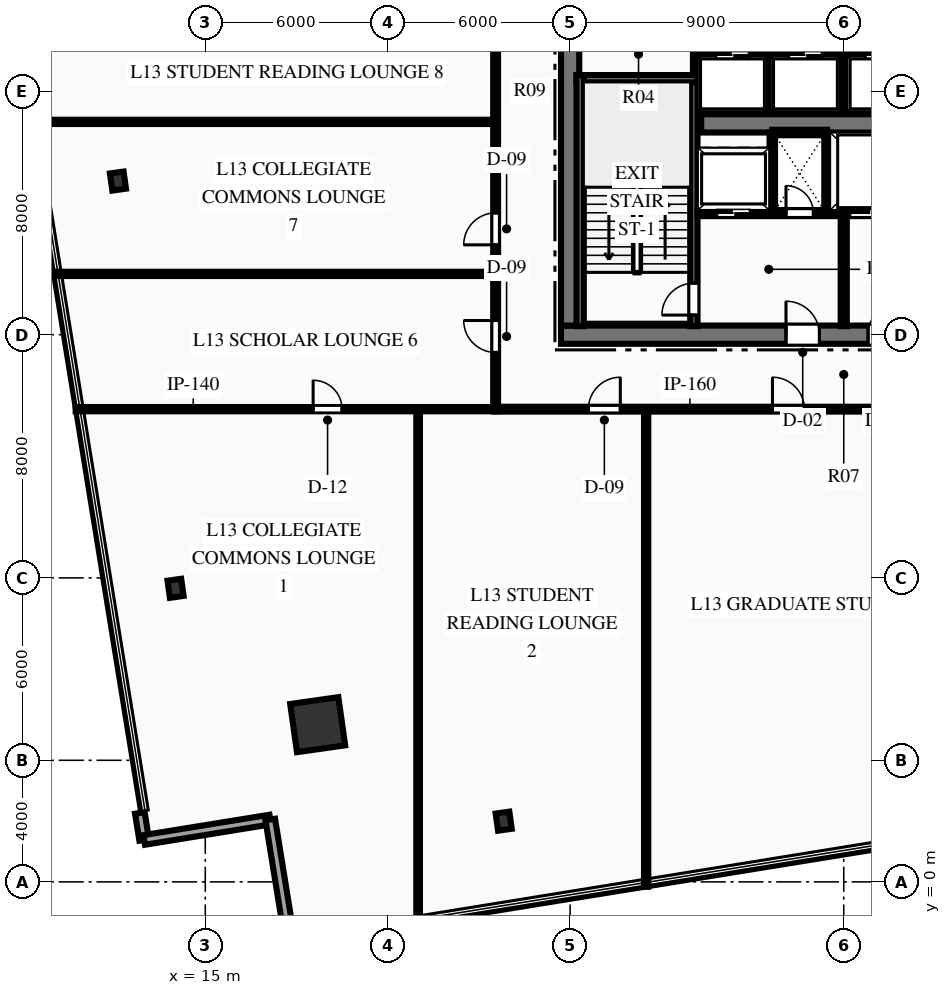
"""IFC4 building model, lengths in metres.
Left out: names, types, materials, properties, quantities, classifications, styles, units other than length and angle.
Written with IfcOpenShell. Run it as: python <this file> out.ifc"""

import sys

from ifc_helpers import new_model, si_unit, direction, frame, frame_2d, origin, origin_2d, place, context, subcontext, project, spatial, rectangle, hollow_rectangle, i_section, extrude, element, fill, save


model = new_model("IFC4")
c1 = context("Model", 3, precision=1e-05, world=origin(), true_north=direction((0.0, 1.0)))
c2 = subcontext(c1, "Body", "Model", "MODEL_VIEW")
j1 = project(units=[si_unit("LENGTHUNIT", "METRE"), si_unit("PLANEANGLEUNIT", "RADIAN")], contexts=[c1])
p1 = place(None, origin())
s1 = spatial("IfcSite", under=j1, at=p1, CompositionType="ELEMENT")
p2 = place(p1, origin())
s2 = spatial("IfcBuilding", under=s1, at=p2, CompositionType="ELEMENT")
p3 = place(p2, frame((0.0, 0.0, 58.95)))
s3 = spatial("IfcBuildingStorey", under=s2, at=p3, CompositionType="ELEMENT", Elevation=58.95)
p4 = place(p3, frame((26.7, 18.0, 0.0), z_axis=(0.0, 0.0, 1.0), x_axis=(1.0, 0.0, 0.0)))
e1 = element("IfcWall", 1, at=p4, inside=s3, PredefinedType="SHEAR", context=c2, shape_type="SweptSolid", body=[
    extrude(rectangle(XDim=18.6, YDim=0.6, at=frame_2d((9.3, 0.0))), origin(), (0.0, 0.0, 1.0), 3.75),
])
p5 = place(p4, frame((7.4, 0.0, 0.0)))
e2 = element("IfcOpeningElement", 2, at=p5, cuts=e1, PredefinedType="OPENING", context=c2, shape_type="SweptSolid", body=[
    extrude(rectangle(XDim=1.1, YDim=2.15, at=frame_2d((0.55, 1.075))), frame((0.0, 0.31, 0.0), z_axis=(0.0, -1.0, 0.0), x_axis=(1.0, 0.0, 0.0)), (0.0, 0.0, 1.0), 0.62),
])
p6 = place(p4, frame((10.1, 0.0, 0.0)))
e3 = element("IfcOpeningElement", 3, at=p6, cuts=e1, PredefinedType="OPENING", context=c2, shape_type="SweptSolid", body=[
    extrude(rectangle(XDim=1.1, YDim=2.15, at=frame_2d((0.55, 1.075))), frame((0.0, 0.31, 0.0), z_axis=(0.0, -1.0, 0.0), x_axis=(1.0, 0.0, 0.0)), (0.0, 0.0, 1.0), 0.62),
])
p7 = place(p3, frame((27.0, 18.3, 0.0), z_axis=(0.0, 0.0, 1.0), x_axis=(0.0, 1.0, 0.0)))
e4 = element("IfcWall", 4, at=p7, inside=s3, PredefinedType="SHEAR", context=c2, shape_type="SweptSolid", body=[
    extrude(rectangle(XDim=15.4, YDim=0.6, at=frame_2d((7.7, 0.0))), origin(), (0.0, 0.0, 1.0), 3.75),
])
p8 = place(p7, frame((9.94, 0.0, 0.0)))
e5 = element("IfcOpeningElement", 5, at=p8, cuts=e4, PredefinedType="OPENING", context=c2, shape_type="SweptSolid", body=[
    extrude(rectangle(XDim=1.4, YDim=2.2, at=frame_2d((0.7, 1.1))), frame((0.0, 0.31, 0.0), z_axis=(0.0, -1.0, 0.0), x_axis=(1.0, 0.0, 0.0)), (0.0, 0.0, 1.0), 0.62),
])
p9 = place(p3, frame((31.31, 24.95, 0.0), z_axis=(0.0, 0.0, 1.0), x_axis=(1.0, 0.0, 0.0)))
e6 = element("IfcWall", 6, at=p9, inside=s3, PredefinedType="SHEAR", context=c2, shape_type="SweptSolid", body=[
    extrude(rectangle(XDim=9.38, YDim=0.6, at=frame_2d((4.69, 0.0))), origin(), (0.0, 0.0, 1.0), 3.75),
])
p10 = place(p3, frame((31.07, 18.28, 0.0), z_axis=(0.0, 0.0, 1.0), x_axis=(0.0, 1.0, 0.0)))
e7 = element("IfcWall", 7, at=p10, inside=s3, PredefinedType="SHEAR", context=c2, shape_type="SweptSolid", body=[
    extrude(rectangle(XDim=8.26, YDim=0.24, at=frame_2d((4.13, 0.0))), origin(), (0.0, 0.0, 1.0), 3.75),
])
p11 = place(p10, frame((0.365, 0.0, 0.0)))
e8 = element("IfcOpeningElement", 8, at=p11, cuts=e7, PredefinedType="OPENING", context=c2, shape_type="SweptSolid", body=[
    extrude(rectangle(XDim=1.05, YDim=2.15, at=frame_2d((0.525, 1.075))), frame((0.0, 0.13, 0.0), z_axis=(0.0, -1.0, 0.0), x_axis=(1.0, 0.0, 0.0)), (0.0, 0.0, 1.0), 0.26),
])
p12 = place(p3, frame((27.21, 26.42, 0.0), z_axis=(0.0, 0.0, 1.0), x_axis=(1.0, 0.0, 0.0)))
e9 = element("IfcWall", 9, at=p12, inside=s3, PredefinedType="SHEAR", context=c2, shape_type="SweptSolid", body=[
    extrude(rectangle(XDim=3.98, YDim=0.24, at=frame_2d((1.99, 0.0))), origin(), (0.0, 0.0, 1.0), 3.75),
])
p13 = place(p3, frame((27.33, 18.28, 0.0), z_axis=(0.0, 0.0, 1.0), x_axis=(0.0, 1.0, 0.0)))
e10 = element("IfcWall", 10, at=p13, inside=s3, PredefinedType="SHEAR", context=c2, shape_type="SweptSolid", body=[
    extrude(rectangle(XDim=8.26, YDim=0.24, at=frame_2d((4.13, 0.0))), origin(), (0.0, 0.0, 1.0), 3.75),
])
p14 = place(p3, frame((18.696, 5.172, 0.0), z_axis=(0.0, 0.0, 1.0), x_axis=(0.990146240249, 0.140037219771, 0.0)))
e11 = element("IfcColumn", 11, at=p14, inside=s3, PredefinedType="COLUMN", context=c2, shape_type="SweptSolid", body=[
    extrude(hollow_rectangle(XDim=1.6, YDim=1.6, WallThickness=0.08, at=origin_2d()), origin(), (0.0, 0.0, 1.0), 3.75),
])
for number, where, z_axis, x_axis in (
    (12, (24.815, 1.997, 0.0), (0.0, 0.0, 1.0), (0.99, 0.14, 0.0)),
    (13, (12.127, 23.053, 0.0), (0.0, 0.0, 1.0), (0.99, 0.14, 0.0)),
    (14, (14.022, 9.657, 0.0), (0.0, 0.0, 1.0), (0.99, 0.14, 0.0)),
):
    element("IfcColumn", number, at=place(p3, frame(where, z_axis=z_axis, x_axis=x_axis)), inside=s3, PredefinedType="COLUMN", context=c2, shape_type="SweptSolid", body=[
        extrude(i_section(OverallWidth=0.454, OverallDepth=0.569, WebThickness=0.078, FlangeThickness=0.125, at=origin_2d()), origin(), (0.0, 0.0, 1.0), 3.75),
    ])
p15 = place(p3, frame((12.99, 1.379, 0.0), z_axis=(0.0, 0.0, 1.0), x_axis=(-0.160042584625, 0.987110110933, 0.0)))
e15 = element("IfcWall", 15, at=p15, inside=s3, PredefinedType="STANDARD", context=c2, shape_type="SweptSolid", body=[
    extrude(rectangle(XDim=0.9, YDim=0.32, at=frame_2d((0.45, 0.0))), origin(), (0.0, 0.0, 1.0), 3.44),
])
p16 = place(p3, frame((17.136, 2.051, 0.0), z_axis=(0.0, 0.0, 1.0), x_axis=(-0.987130042681, -0.159919601167, 0.0)))
e16 = element("IfcWall", 16, at=p16, inside=s3, PredefinedType="STANDARD", context=c2, shape_type="SweptSolid", body=[
    extrude(rectangle(XDim=4.2, YDim=0.32, at=frame_2d((2.1, 0.0))), origin(), (0.0, 0.0, 1.0), 3.44),
])
p17 = place(p3, frame((17.808, -2.095, 0.0), z_axis=(0.0, 0.0, 1.0), x_axis=(-0.159910424973, 0.987131529222, 0.0)))
e17 = element("IfcWall", 17, at=p17, inside=s3, PredefinedType="STANDARD", context=c2, shape_type="SweptSolid", body=[
    extrude(rectangle(XDim=4.2, YDim=0.32, at=frame_2d((2.1, 0.0))), origin(), (0.0, 0.0, 1.0), 3.44),
])
p18 = place(p3, frame((36.0, 18.28, 0.0), z_axis=(0.0, 0.0, 1.0), x_axis=(0.0, 1.0, 0.0)))
e18 = element("IfcWall", 18, at=p18, inside=s3, PredefinedType="PARTITIONING", context=c2, shape_type="SweptSolid", body=[
    extrude(rectangle(XDim=3.77, YDim=0.2, at=frame_2d((1.885, 0.0))), origin(), (0.0, 0.0, 1.0), 3.44),
])
p19 = place(p3, frame((31.19, 22.0, 0.0), z_axis=(0.0, 0.0, 1.0), x_axis=(1.0, 0.0, 0.0)))
e19 = element("IfcWall", 19, at=p19, inside=s3, PredefinedType="PARTITIONING", context=c2, shape_type="SweptSolid", body=[
    extrude(rectangle(XDim=4.69, YDim=0.2, at=frame_2d((2.345, 0.0))), origin(), (0.0, 0.0, 1.0), 3.44),
])
p20 = place(p19, frame((2.91, 0.0, 0.0)))
e20 = element("IfcOpeningElement", 20, at=p20, cuts=e19, PredefinedType="OPENING", context=c2, shape_type="SweptSolid", body=[
    extrude(rectangle(XDim=0.9, YDim=2.15, at=frame_2d((0.45, 1.075))), frame((0.0, 0.11, 0.0), z_axis=(0.0, -1.0, 0.0), x_axis=(1.0, 0.0, 0.0)), (0.0, 0.0, 1.0), 0.22),
])
p21 = place(p19, frame((0.635, 0.0, 0.0)))
e21 = element("IfcOpeningElement", 21, at=p21, cuts=e19, PredefinedType="OPENING", context=c2, shape_type="SweptSolid", body=[
    extrude(rectangle(XDim=1.1, YDim=2.15, at=frame_2d((0.55, 1.075))), frame((0.0, 0.11, 0.0), z_axis=(0.0, -1.0, 0.0), x_axis=(1.0, 0.0, 0.0)), (0.0, 0.0, 1.0), 0.22),
])
p22 = place(p3, frame((36.12, 22.0, 0.0), z_axis=(0.0, 0.0, 1.0), x_axis=(1.0, 0.0, 0.0)))
e22 = element("IfcWall", 22, at=p22, inside=s3, PredefinedType="PARTITIONING", context=c2, shape_type="SweptSolid", body=[
    extrude(rectangle(XDim=4.69, YDim=0.2, at=frame_2d((2.345, 0.0))), origin(), (0.0, 0.0, 1.0), 3.44),
])
p23 = place(p22, frame((2.955, 0.0, 0.0)))
e23 = element("IfcOpeningElement", 23, at=p23, cuts=e22, PredefinedType="OPENING", context=c2, shape_type="SweptSolid", body=[
    extrude(rectangle(XDim=1.1, YDim=2.15, at=frame_2d((0.55, 1.075))), frame((0.0, 0.11, 0.0), z_axis=(0.0, -1.0, 0.0), x_axis=(1.0, 0.0, 0.0)), (0.0, 0.0, 1.0), 0.22),
])
p24 = place(p22, frame((0.08, 0.0, 0.0)))
e24 = element("IfcOpeningElement", 24, at=p24, cuts=e22, PredefinedType="OPENING", context=c2, shape_type="SweptSolid", body=[
    extrude(rectangle(XDim=1.4, YDim=2.2, at=frame_2d((0.7, 1.1))), frame((0.0, 0.11, 0.0), z_axis=(0.0, -1.0, 0.0), x_axis=(1.0, 0.0, 0.0)), (0.0, 0.0, 1.0), 0.22),
])
for number, where, z_axis, x_axis in (
    (25, (33.65, 22.05, 0.0), (0.0, 0.0, 1.0), (0.0, 1.0, 0.0)),
    (26, (35.45, 22.05, 0.0), (0.0, 0.0, 1.0), (0.0, 1.0, 0.0)),
):
    element("IfcWall", number, at=place(p3, frame(where, z_axis=z_axis, x_axis=x_axis)), inside=s3, PredefinedType="PARTITIONING", context=c2, shape_type="SweptSolid", body=[
        extrude(rectangle(XDim=2.6, YDim=0.18, at=frame_2d((1.3, 0.0))), origin(), (0.0, 0.0, 1.0), 3.44),
    ])
p25 = place(p3, frame((33.65, 24.65, 0.0), z_axis=(0.0, 0.0, 1.0), x_axis=(1.0, 0.0, 0.0)))
e27 = element("IfcWall", 27, at=p25, inside=s3, PredefinedType="PARTITIONING", context=c2, shape_type="SweptSolid", body=[
    extrude(rectangle(XDim=1.8, YDim=0.18, at=frame_2d((0.9, 0.0))), origin(), (0.0, 0.0, 1.0), 3.44),
])
p26 = place(p3, frame((31.12, 26.54, 0.0), z_axis=(0.0, 0.0, 1.0), x_axis=(0.0, 1.0, 0.0)))
e28 = element("IfcWall", 28, at=p26, inside=s3, PredefinedType="PARTITIONING", context=c2, shape_type="SweptSolid", body=[
    extrude(rectangle(XDim=1.51, YDim=0.16, at=frame_2d((0.755, 0.0))), origin(), (0.0, 0.0, 1.0), 3.44),
])
p27 = place(p3, frame((31.2, 27.2, 0.0), z_axis=(0.0, 0.0, 1.0), x_axis=(1.0, 0.0, 0.0)))
e29 = element("IfcWall", 29, at=p27, inside=s3, PredefinedType="PARTITIONING", context=c2, shape_type="SweptSolid", body=[
    extrude(rectangle(XDim=9.6, YDim=0.18, at=frame_2d((4.8, 0.0))), origin(), (0.0, 0.0, 1.0), 3.44),
])
p28 = place(p27, frame((0.59, 0.0, 0.0)))
e30 = element("IfcOpeningElement", 30, at=p28, cuts=e29, PredefinedType="OPENING", context=c2, shape_type="SweptSolid", body=[
    extrude(rectangle(XDim=1.1, YDim=2.15, at=frame_2d((0.55, 1.075))), frame((0.0, 0.1, 0.0), z_axis=(0.0, -1.0, 0.0), x_axis=(1.0, 0.0, 0.0)), (0.0, 0.0, 1.0), 0.2),
])
p29 = place(p27, frame((2.99, 0.0, 0.0)))
e31 = element("IfcOpeningElement", 31, at=p29, cuts=e29, PredefinedType="OPENING", context=c2, shape_type="SweptSolid", body=[
    extrude(rectangle(XDim=1.1, YDim=2.15, at=frame_2d((0.55, 1.075))), frame((0.0, 0.1, 0.0), z_axis=(0.0, -1.0, 0.0), x_axis=(1.0, 0.0, 0.0)), (0.0, 0.0, 1.0), 0.2),
])
p30 = place(p27, frame((5.51, 0.0, 0.0)))
e32 = element("IfcOpeningElement", 32, at=p30, cuts=e29, PredefinedType="OPENING", context=c2, shape_type="SweptSolid", body=[
    extrude(rectangle(XDim=1.1, YDim=2.15, at=frame_2d((0.55, 1.075))), frame((0.0, 0.1, 0.0), z_axis=(0.0, -1.0, 0.0), x_axis=(1.0, 0.0, 0.0)), (0.0, 0.0, 1.0), 0.2),
])
p31 = place(p27, frame((7.91, 0.0, 0.0)))
e33 = element("IfcOpeningElement", 33, at=p31, cuts=e29, PredefinedType="OPENING", context=c2, shape_type="SweptSolid", body=[
    extrude(rectangle(XDim=1.1, YDim=2.15, at=frame_2d((0.55, 1.075))), frame((0.0, 0.1, 0.0), z_axis=(0.0, -1.0, 0.0), x_axis=(1.0, 0.0, 0.0)), (0.0, 0.0, 1.0), 0.2),
])
for number, where, z_axis, x_axis in (
    (34, (33.54, 25.3, 0.0), (0.0, 0.0, 1.0), (0.0, 1.0, 0.0)),
    (35, (36.0, 25.3, 0.0), (0.0, 0.0, 1.0), (0.0, 1.0, 0.0)),
):
    element("IfcWall", number, at=place(p3, frame(where, z_axis=z_axis, x_axis=x_axis)), inside=s3, PredefinedType="PARTITIONING", context=c2, shape_type="SweptSolid", body=[
        extrude(rectangle(XDim=1.9, YDim=0.18, at=frame_2d((0.95, 0.0))), origin(), (0.0, 0.0, 1.0), 3.44),
    ])
p32 = place(p3, frame((24.5, 15.55, 0.0), z_axis=(0.0, 0.0, 1.0), x_axis=(1.0, 0.0, 0.0)))
e36 = element("IfcWall", 36, at=p32, inside=s3, PredefinedType="PARTITIONING", context=c2, shape_type="SweptSolid", body=[
    extrude(rectangle(XDim=23.0, YDim=0.16, at=frame_2d((11.5, 0.0))), origin(), (0.0, 0.0, 1.0), 3.44),
])
p33 = place(p32, frame((3.101, 0.0, 0.0)))
e37 = element("IfcOpeningElement", 37, at=p33, cuts=e36, PredefinedType="OPENING", context=c2, shape_type="SweptSolid", body=[
    extrude(rectangle(XDim=1.05, YDim=2.15, at=frame_2d((0.525, 1.075))), frame((0.0, 0.09, 0.0), z_axis=(0.0, -1.0, 0.0), x_axis=(1.0, 0.0, 0.0)), (0.0, 0.0, 1.0), 0.18),
])
p34 = place(p32, frame((9.155, 0.0, 0.0)))
e38 = element("IfcOpeningElement", 38, at=p34, cuts=e36, PredefinedType="OPENING", context=c2, shape_type="SweptSolid", body=[
    extrude(rectangle(XDim=1.05, YDim=2.15, at=frame_2d((0.525, 1.075))), frame((0.0, 0.09, 0.0), z_axis=(0.0, -1.0, 0.0), x_axis=(1.0, 0.0, 0.0)), (0.0, 0.0, 1.0), 0.18),
])
p35 = place(p32, frame((20.28, 0.0, 0.0)))
e39 = element("IfcOpeningElement", 39, at=p35, cuts=e36, PredefinedType="OPENING", context=c2, shape_type="SweptSolid", body=[
    extrude(rectangle(XDim=1.05, YDim=2.15, at=frame_2d((0.525, 1.075))), frame((0.0, 0.09, 0.0), z_axis=(0.0, -1.0, 0.0), x_axis=(1.0, 0.0, 0.0)), (0.0, 0.0, 1.0), 0.18),
])
p36 = place(p3, frame((24.55, 15.55, 0.0), z_axis=(0.0, 0.0, 1.0), x_axis=(0.0, 1.0, 0.0)))
e40 = element("IfcWall", 40, at=p36, inside=s3, PredefinedType="PARTITIONING", context=c2, shape_type="SweptSolid", body=[
    extrude(rectangle(XDim=20.9, YDim=0.16, at=frame_2d((10.45, 0.0))), origin(), (0.0, 0.0, 1.0), 3.44),
])
p37 = place(p36, frame((1.866, 0.0, 0.0)))
e41 = element("IfcOpeningElement", 41, at=p37, cuts=e40, PredefinedType="OPENING", context=c2, shape_type="SweptSolid", body=[
    extrude(rectangle(XDim=1.05, YDim=2.15, at=frame_2d((0.525, 1.075))), frame((0.0, 0.09, 0.0), z_axis=(0.0, -1.0, 0.0), x_axis=(1.0, 0.0, 0.0)), (0.0, 0.0, 1.0), 0.18),
])
p38 = place(p36, frame((5.405, 0.0, 0.0)))
e42 = element("IfcOpeningElement", 42, at=p38, cuts=e40, PredefinedType="OPENING", context=c2, shape_type="SweptSolid", body=[
    extrude(rectangle(XDim=1.05, YDim=2.15, at=frame_2d((0.525, 1.075))), frame((0.0, 0.09, 0.0), z_axis=(0.0, -1.0, 0.0), x_axis=(1.0, 0.0, 0.0)), (0.0, 0.0, 1.0), 0.18),
])
p39 = place(p36, frame((12.581, 0.0, 0.0)))
e43 = element("IfcOpeningElement", 43, at=p39, cuts=e40, PredefinedType="OPENING", context=c2, shape_type="SweptSolid", body=[
    extrude(rectangle(XDim=1.05, YDim=2.15, at=frame_2d((0.525, 1.075))), frame((0.0, 0.09, 0.0), z_axis=(0.0, -1.0, 0.0), x_axis=(1.0, 0.0, 0.0)), (0.0, 0.0, 1.0), 0.18),
])
p40 = place(p36, frame((15.899, 0.0, 0.0)))
e44 = element("IfcOpeningElement", 44, at=p40, cuts=e40, PredefinedType="OPENING", context=c2, shape_type="SweptSolid", body=[
    extrude(rectangle(XDim=1.05, YDim=2.15, at=frame_2d((0.525, 1.075))), frame((0.0, 0.09, 0.0), z_axis=(0.0, -1.0, 0.0), x_axis=(1.0, 0.0, 0.0)), (0.0, 0.0, 1.0), 0.18),
])
p41 = place(p3, frame((10.736, 15.55, 0.0), z_axis=(0.0, 0.0, 1.0), x_axis=(1.0, 0.0, 0.0)))
e45 = element("IfcWall", 45, at=p41, inside=s3, PredefinedType="PARTITIONING", context=c2, shape_type="SweptSolid", body=[
    extrude(rectangle(XDim=13.814, YDim=0.14, at=frame_2d((6.907, 0.0))), origin(), (0.0, 0.0, 1.0), 3.44),
])
p42 = place(p41, frame((7.811, 0.0, 0.0)))
e46 = element("IfcOpeningElement", 46, at=p42, cuts=e45, PredefinedType="OPENING", context=c2, shape_type="SweptSolid", body=[
    extrude(rectangle(XDim=0.95, YDim=2.15, at=frame_2d((0.475, 1.075))), frame((0.0, 0.08, 0.0), z_axis=(0.0, -1.0, 0.0), x_axis=(1.0, 0.0, 0.0)), (0.0, 0.0, 1.0), 0.16),
])
p43 = place(p3, frame((22.0, -1.375, 0.0), z_axis=(0.0, 0.0, 1.0), x_axis=(0.0, 1.0, 0.0)))
e47 = element("IfcWall", 47, at=p43, inside=s3, PredefinedType="PARTITIONING", context=c2, shape_type="SweptSolid", body=[
    extrude(rectangle(XDim=16.926, YDim=0.12, at=frame_2d((8.463, 0.0))), origin(), (0.0, 0.0, 1.0), 3.44),
])
p44 = place(p3, frame((29.5, -0.161, 0.0), z_axis=(0.0, 0.0, 1.0), x_axis=(0.0, 1.0, 0.0)))
e48 = element("IfcWall", 48, at=p44, inside=s3, PredefinedType="PARTITIONING", context=c2, shape_type="SweptSolid", body=[
    extrude(rectangle(XDim=15.711, YDim=0.14, at=frame_2d((7.855, 0.0))), origin(), (0.0, 0.0, 1.0), 3.44),
])
p45 = place(p3, frame((10.015, 20.0, 0.0), z_axis=(0.0, 0.0, 1.0), x_axis=(1.0, 0.0, 0.0)))
e49 = element("IfcWall", 49, at=p45, inside=s3, PredefinedType="PARTITIONING", context=c2, shape_type="SweptSolid", body=[
    extrude(rectangle(XDim=14.535, YDim=0.14, at=frame_2d((7.268, 0.0))), origin(), (0.0, 0.0, 1.0), 3.44),
])
p46 = place(p3, frame((9.205, 25.0, 0.0), z_axis=(0.0, 0.0, 1.0), x_axis=(1.0, 0.0, 0.0)))
e50 = element("IfcWall", 50, at=p46, inside=s3, PredefinedType="PARTITIONING", context=c2, shape_type="SweptSolid", body=[
    extrude(rectangle(XDim=15.345, YDim=0.14, at=frame_2d((7.672, 0.0))), origin(), (0.0, 0.0, 1.0), 3.44),
])
p47 = place(p11, origin())
e51 = element("IfcDoor", 51, at=p47, inside=s3, OperationType="SINGLE_SWING_LEFT", PredefinedType="DOOR", context=c2, shape_type="SweptSolid", body=[
    extrude(rectangle(XDim=1.05, YDim=2.15, at=frame_2d((0.525, 1.075))), frame((0.0, 0.025, 0.0), z_axis=(0.0, -1.0, 0.0), x_axis=(1.0, 0.0, 0.0)), (0.0, 0.0, 1.0), 0.05),
])
fill(e8, e51)
p48 = place(p5, origin())
e52 = element("IfcDoor", 52, at=p48, inside=s3, OperationType="SINGLE_SWING_LEFT", PredefinedType="DOOR", context=c2, shape_type="SweptSolid", body=[
    extrude(rectangle(XDim=1.1, YDim=2.15, at=frame_2d((0.55, 1.075))), frame((0.0, 0.025, 0.0), z_axis=(0.0, -1.0, 0.0), x_axis=(1.0, 0.0, 0.0)), (0.0, 0.0, 1.0), 0.05),
])
fill(e2, e52)
p49 = place(p6, origin())
e53 = element("IfcDoor", 53, at=p49, inside=s3, OperationType="SINGLE_SWING_RIGHT", PredefinedType="DOOR", context=c2, shape_type="SweptSolid", body=[
    extrude(rectangle(XDim=1.1, YDim=2.15, at=frame_2d((0.55, 1.075))), frame((0.0, 0.025, 0.0), z_axis=(0.0, -1.0, 0.0), x_axis=(1.0, 0.0, 0.0)), (0.0, 0.0, 1.0), 0.05),
])
fill(e3, e53)
p50 = place(p20, origin())
e54 = element("IfcDoor", 54, at=p50, inside=s3, OperationType="SINGLE_SWING_LEFT", PredefinedType="DOOR", context=c2, shape_type="SweptSolid", body=[
    extrude(rectangle(XDim=0.9, YDim=2.15, at=frame_2d((0.45, 1.075))), frame((0.0, 0.025, 0.0), z_axis=(0.0, -1.0, 0.0), x_axis=(1.0, 0.0, 0.0)), (0.0, 0.0, 1.0), 0.05),
])
fill(e20, e54)
p51 = place(p42, origin())
e55 = element("IfcDoor", 55, at=p51, inside=s3, OperationType="SINGLE_SWING_LEFT", PredefinedType="DOOR", context=c2, shape_type="SweptSolid", body=[
    extrude(rectangle(XDim=0.95, YDim=2.15, at=frame_2d((0.475, 1.075))), frame((0.0, 0.025, 0.0), z_axis=(0.0, -1.0, 0.0), x_axis=(1.0, 0.0, 0.0)), (0.0, 0.0, 1.0), 0.05),
])
fill(e46, e55)
p52 = place(p33, origin())
e56 = element("IfcDoor", 56, at=p52, inside=s3, OperationType="SINGLE_SWING_RIGHT", PredefinedType="DOOR", context=c2, shape_type="SweptSolid", body=[
    extrude(rectangle(XDim=1.05, YDim=2.15, at=frame_2d((0.525, 1.075))), frame((0.0, 0.025, 0.0), z_axis=(0.0, -1.0, 0.0), x_axis=(1.0, 0.0, 0.0)), (0.0, 0.0, 1.0), 0.05),
])
fill(e37, e56)
p53 = place(p34, origin())
e57 = element("IfcDoor", 57, at=p53, inside=s3, OperationType="SINGLE_SWING_LEFT", PredefinedType="DOOR", context=c2, shape_type="SweptSolid", body=[
    extrude(rectangle(XDim=1.05, YDim=2.15, at=frame_2d((0.525, 1.075))), frame((0.0, 0.025, 0.0), z_axis=(0.0, -1.0, 0.0), x_axis=(1.0, 0.0, 0.0)), (0.0, 0.0, 1.0), 0.05),
])
fill(e38, e57)
p54 = place(p37, origin())
e58 = element("IfcDoor", 58, at=p54, inside=s3, OperationType="SINGLE_SWING_RIGHT", PredefinedType="DOOR", context=c2, shape_type="SweptSolid", body=[
    extrude(rectangle(XDim=1.05, YDim=2.15, at=frame_2d((0.525, 1.075))), frame((0.0, 0.025, 0.0), z_axis=(0.0, -1.0, 0.0), x_axis=(1.0, 0.0, 0.0)), (0.0, 0.0, 1.0), 0.05),
])
fill(e41, e58)
p55 = place(p38, origin())
e59 = element("IfcDoor", 59, at=p55, inside=s3, OperationType="SINGLE_SWING_LEFT", PredefinedType="DOOR", context=c2, shape_type="SweptSolid", body=[
    extrude(rectangle(XDim=1.05, YDim=2.15, at=frame_2d((0.525, 1.075))), frame((0.0, 0.025, 0.0), z_axis=(0.0, -1.0, 0.0), x_axis=(1.0, 0.0, 0.0)), (0.0, 0.0, 1.0), 0.05),
])
fill(e42, e59)
p56 = place(p28, origin())
e60 = element("IfcDoor", 60, at=p56, inside=s3, OperationType="SLIDING_TO_LEFT", PredefinedType="DOOR", context=c2, shape_type="SweptSolid", body=[
    extrude(rectangle(XDim=1.1, YDim=2.15, at=frame_2d((0.55, 1.075))), frame((0.0, 0.025, 0.0), z_axis=(0.0, -1.0, 0.0), x_axis=(1.0, 0.0, 0.0)), (0.0, 0.0, 1.0), 0.05),
])
fill(e30, e60)
p57 = place(p29, origin())
e61 = element("IfcDoor", 61, at=p57, inside=s3, OperationType="SLIDING_TO_LEFT", PredefinedType="DOOR", context=c2, shape_type="SweptSolid", body=[
    extrude(rectangle(XDim=1.1, YDim=2.15, at=frame_2d((0.55, 1.075))), frame((0.0, 0.025, 0.0), z_axis=(0.0, -1.0, 0.0), x_axis=(1.0, 0.0, 0.0)), (0.0, 0.0, 1.0), 0.05),
])
fill(e31, e61)
p58 = place(p30, origin())
e62 = element("IfcDoor", 62, at=p58, inside=s3, OperationType="SLIDING_TO_LEFT", PredefinedType="DOOR", context=c2, shape_type="SweptSolid", body=[
    extrude(rectangle(XDim=1.1, YDim=2.15, at=frame_2d((0.55, 1.075))), frame((0.0, 0.025, 0.0), z_axis=(0.0, -1.0, 0.0), x_axis=(1.0, 0.0, 0.0)), (0.0, 0.0, 1.0), 0.05),
])
fill(e32, e62)
p59 = place(p21, origin())
e63 = element("IfcDoor", 63, at=p59, inside=s3, OperationType="SLIDING_TO_LEFT", PredefinedType="DOOR", context=c2, shape_type="SweptSolid", body=[
    extrude(rectangle(XDim=1.1, YDim=2.15, at=frame_2d((0.55, 1.075))), frame((0.0, 0.025, 0.0), z_axis=(0.0, -1.0, 0.0), x_axis=(1.0, 0.0, 0.0)), (0.0, 0.0, 1.0), 0.05),
])
fill(e21, e63)
p60 = place(p24, origin())
e64 = element("IfcDoor", 64, at=p60, inside=s3, OperationType="SLIDING_TO_LEFT", PredefinedType="DOOR", context=c2, shape_type="SweptSolid", body=[
    extrude(rectangle(XDim=1.4, YDim=2.2, at=frame_2d((0.7, 1.1))), frame((0.0, 0.025, 0.0), z_axis=(0.0, -1.0, 0.0), x_axis=(1.0, 0.0, 0.0)), (0.0, 0.0, 1.0), 0.05),
])
fill(e24, e64)
save(model, sys.argv[1])
